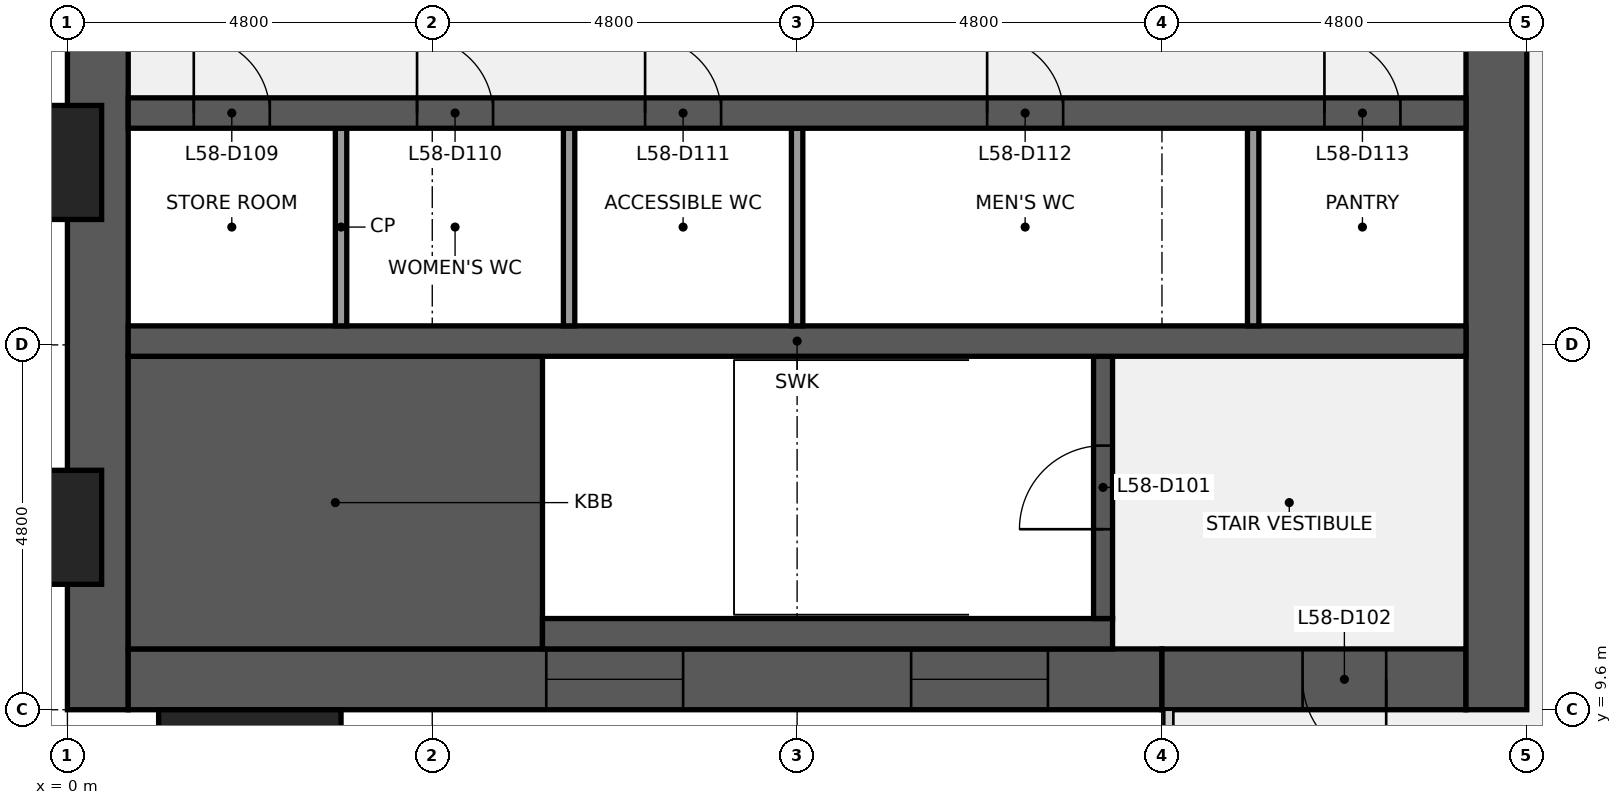
"""IFC4 building model, lengths in metres.
Left out: names, types, materials, properties, quantities, classifications, styles, units other than length and angle.
Written with IfcOpenShell. Run it as: python <this file> out.ifc"""

import sys

from ifc_helpers import new_model, si_unit, direction, frame, frame_2d, origin, origin_2d, place, context, subcontext, project, spatial, rectangle, extrude, element, fill, save


model = new_model("IFC4")
c1 = context("Model", 3, precision=1e-05, world=origin(), true_north=direction((0.0, 1.0)))
c2 = subcontext(c1, "Body", "Model", "MODEL_VIEW")
j1 = project(units=[si_unit("LENGTHUNIT", "METRE"), si_unit("PLANEANGLEUNIT", "RADIAN")], contexts=[c1])
p1 = place(None, origin())
s1 = spatial("IfcSite", under=j1, at=p1, CompositionType="ELEMENT")
p2 = place(p1, origin())
s2 = spatial("IfcBuilding", under=s1, at=p2, CompositionType="ELEMENT")
p3 = place(p2, frame((0.0, 0.0, 261.2)))
s3 = spatial("IfcBuildingStorey", under=s2, at=p3, CompositionType="ELEMENT", Elevation=261.2)
p4 = place(p3, frame((0.4, 9.6, 0.0), z_axis=(0.0, 0.0, 1.0), x_axis=(0.0, 1.0, 0.0)))
e1 = element("IfcWall", 1, at=p4, inside=s3, PredefinedType="SHEAR", context=c2, shape_type="SweptSolid", body=[
    extrude(rectangle(XDim=28.8, YDim=0.8, at=frame_2d((14.4, 0.0))), origin(), (0.0, 0.0, 1.0), 3.7),
])
p5 = place(p4, frame((8.85, 0.0, 0.9)))
e2 = element("IfcOpeningElement", 2, at=p5, cuts=e1, PredefinedType="OPENING", context=c2, shape_type="SweptSolid", body=[
    extrude(rectangle(XDim=1.5, YDim=1.5, at=frame_2d((0.75, 0.75))), frame((0.0, 0.41, 0.0), z_axis=(0.0, -1.0, 0.0), x_axis=(1.0, 0.0, 0.0)), (0.0, 0.0, 1.0), 0.82),
])
p6 = place(p4, frame((18.45, 0.0, 0.9)))
e3 = element("IfcOpeningElement", 3, at=p6, cuts=e1, PredefinedType="OPENING", context=c2, shape_type="SweptSolid", body=[
    extrude(rectangle(XDim=1.5, YDim=1.5, at=frame_2d((0.75, 0.75))), frame((0.0, 0.41, 0.0), z_axis=(0.0, -1.0, 0.0), x_axis=(1.0, 0.0, 0.0)), (0.0, 0.0, 1.0), 0.82),
])
p7 = place(p3, frame((14.4, 10.0, 0.0), z_axis=(0.0, 0.0, 1.0), x_axis=(-1.0, 0.0, 0.0)))
e4 = element("IfcWall", 4, at=p7, inside=s3, PredefinedType="SHEAR", context=c2, shape_type="SweptSolid", body=[
    extrude(rectangle(XDim=13.6, YDim=0.8, at=frame_2d((6.8, 0.0))), origin(), (0.0, 0.0, 1.0), 3.7),
])
p8 = place(p7, frame((6.3, 0.0, 0.9)))
e5 = element("IfcOpeningElement", 5, at=p8, cuts=e4, PredefinedType="OPENING", context=c2, shape_type="SweptSolid", body=[
    extrude(rectangle(XDim=1.8, YDim=1.5, at=frame_2d((0.9, 0.75))), frame((0.0, 0.41, 0.0), z_axis=(0.0, -1.0, 0.0), x_axis=(1.0, 0.0, 0.0)), (0.0, 0.0, 1.0), 0.82),
])
p9 = place(p7, frame((1.5, 0.0, 0.9)))
e6 = element("IfcOpeningElement", 6, at=p9, cuts=e4, PredefinedType="OPENING", context=c2, shape_type="SweptSolid", body=[
    extrude(rectangle(XDim=1.8, YDim=1.5, at=frame_2d((0.9, 0.75))), frame((0.0, 0.41, 0.0), z_axis=(0.0, -1.0, 0.0), x_axis=(1.0, 0.0, 0.0)), (0.0, 0.0, 1.0), 0.82),
])
p10 = place(p3, frame((18.4, 10.0, 0.0), z_axis=(0.0, 0.0, 1.0), x_axis=(-1.0, 0.0, 0.0)))
e7 = element("IfcWall", 7, at=p10, inside=s3, PredefinedType="SHEAR", context=c2, shape_type="SweptSolid", body=[
    extrude(rectangle(XDim=4.0, YDim=0.8, at=frame_2d((2.0, 0.0))), origin(), (0.0, 0.0, 1.0), 3.7),
])
p11 = place(p10, frame((1.05, 0.0, 0.0)))
e8 = element("IfcOpeningElement", 8, at=p11, cuts=e7, PredefinedType="OPENING", context=c2, shape_type="SweptSolid", body=[
    extrude(rectangle(XDim=1.1, YDim=2.1, at=frame_2d((0.55, 1.05))), frame((0.0, 0.41, 0.0), z_axis=(0.0, -1.0, 0.0), x_axis=(1.0, 0.0, 0.0)), (0.0, 0.0, 1.0), 0.82),
])
p12 = place(p3, frame((18.8, 38.4, 0.0), z_axis=(0.0, 0.0, 1.0), x_axis=(0.0, -1.0, 0.0)))
e9 = element("IfcWall", 9, at=p12, inside=s3, PredefinedType="SHEAR", context=c2, shape_type="SweptSolid", body=[
    extrude(rectangle(XDim=28.8, YDim=0.8, at=frame_2d((14.4, 0.0))), origin(), (0.0, 0.0, 1.0), 3.7),
])
p13 = place(p12, frame((18.3, 0.0, 0.0)))
e10 = element("IfcOpeningElement", 10, at=p13, cuts=e9, PredefinedType="OPENING", context=c2, shape_type="SweptSolid", body=[
    extrude(rectangle(XDim=1.8, YDim=2.1, at=frame_2d((0.9, 1.05))), frame((0.0, 0.41, 0.0), z_axis=(0.0, -1.0, 0.0), x_axis=(1.0, 0.0, 0.0)), (0.0, 0.0, 1.0), 0.82),
])
p14 = place(p12, frame((8.7, 0.0, 0.0)))
e11 = element("IfcOpeningElement", 11, at=p14, cuts=e9, PredefinedType="OPENING", context=c2, shape_type="SweptSolid", body=[
    extrude(rectangle(XDim=1.8, YDim=2.1, at=frame_2d((0.9, 1.05))), frame((0.0, 0.41, 0.0), z_axis=(0.0, -1.0, 0.0), x_axis=(1.0, 0.0, 0.0)), (0.0, 0.0, 1.0), 0.82),
])
p15 = place(p3, frame((0.8, 12.325, 0.0), z_axis=(0.0, 0.0, 1.0), x_axis=(1.0, 0.0, 0.0)))
e12 = element("IfcWall", 12, at=p15, inside=s3, PredefinedType="SHEAR", context=c2, shape_type="SweptSolid", body=[
    extrude(rectangle(XDim=5.45, YDim=3.85, at=frame_2d((2.725, 0.0))), origin(), (0.0, 0.0, 1.0), 3.7),
])
p16 = place(p3, frame((6.25, 10.6, 0.0), z_axis=(0.0, 0.0, 1.0), x_axis=(1.0, 0.0, 0.0)))
e13 = element("IfcWall", 13, at=p16, inside=s3, PredefinedType="SHEAR", context=c2, shape_type="SweptSolid", body=[
    extrude(rectangle(XDim=7.5, YDim=0.4, at=frame_2d((3.75, 0.0))), origin(), (0.0, 0.0, 1.0), 3.7),
])
p17 = place(p3, frame((13.625, 10.8, 0.0), z_axis=(0.0, 0.0, 1.0), x_axis=(0.0, 1.0, 0.0)))
e14 = element("IfcWall", 14, at=p17, inside=s3, PredefinedType="SHEAR", context=c2, shape_type="SweptSolid", body=[
    extrude(rectangle(XDim=3.45, YDim=0.25, at=frame_2d((1.725, 0.0))), origin(), (0.0, 0.0, 1.0), 3.7),
])
p18 = place(p17, frame((1.175, 0.0, 0.0)))
e15 = element("IfcOpeningElement", 15, at=p18, cuts=e14, PredefinedType="OPENING", context=c2, shape_type="SweptSolid", body=[
    extrude(rectangle(XDim=1.1, YDim=2.1, at=frame_2d((0.55, 1.05))), frame((0.0, 0.135, 0.0), z_axis=(0.0, -1.0, 0.0), x_axis=(1.0, 0.0, 0.0)), (0.0, 0.0, 1.0), 0.27),
])
p19 = place(p3, frame((0.8, 14.45, 0.0), z_axis=(0.0, 0.0, 1.0), x_axis=(1.0, 0.0, 0.0)))
e16 = element("IfcWall", 16, at=p19, inside=s3, PredefinedType="SHEAR", context=c2, shape_type="SweptSolid", body=[
    extrude(rectangle(XDim=17.6, YDim=0.4, at=frame_2d((8.8, 0.0))), origin(), (0.0, 0.0, 1.0), 3.7),
])
for number, where, z_axis, x_axis in (
    (17, (3.6, 14.65, 0.0), (0.0, 0.0, 1.0), (0.0, 1.0, 0.0)),
    (18, (6.6, 14.65, 0.0), (0.0, 0.0, 1.0), (0.0, 1.0, 0.0)),
    (19, (9.6, 14.65, 0.0), (0.0, 0.0, 1.0), (0.0, 1.0, 0.0)),
    (20, (15.6, 14.65, 0.0), (0.0, 0.0, 1.0), (0.0, 1.0, 0.0)),
):
    element("IfcWall", number, at=place(p3, frame(where, z_axis=z_axis, x_axis=x_axis)), inside=s3, PredefinedType="PARTITIONING", context=c2, shape_type="SweptSolid", body=[
        extrude(rectangle(XDim=2.6, YDim=0.15, at=frame_2d((1.3, 0.0))), origin(), (0.0, 0.0, 1.0), 3.7),
    ])
p20 = place(p3, frame((0.8, 17.45, 0.0), z_axis=(0.0, 0.0, 1.0), x_axis=(1.0, 0.0, 0.0)))
e21 = element("IfcWall", 21, at=p20, inside=s3, PredefinedType="SHEAR", context=c2, shape_type="SweptSolid", body=[
    extrude(rectangle(XDim=17.6, YDim=0.4, at=frame_2d((8.8, 0.0))), origin(), (0.0, 0.0, 1.0), 3.7),
])
p21 = place(p20, frame((0.863, 0.0, 0.0)))
e22 = element("IfcOpeningElement", 22, at=p21, cuts=e21, PredefinedType="OPENING", context=c2, shape_type="SweptSolid", body=[
    extrude(rectangle(XDim=1.0, YDim=2.1, at=frame_2d((0.5, 1.05))), frame((0.0, 0.21, 0.0), z_axis=(0.0, -1.0, 0.0), x_axis=(1.0, 0.0, 0.0)), (0.0, 0.0, 1.0), 0.42),
])
p22 = place(p20, frame((3.8, 0.0, 0.0)))
e23 = element("IfcOpeningElement", 23, at=p22, cuts=e21, PredefinedType="OPENING", context=c2, shape_type="SweptSolid", body=[
    extrude(rectangle(XDim=1.0, YDim=2.1, at=frame_2d((0.5, 1.05))), frame((0.0, 0.21, 0.0), z_axis=(0.0, -1.0, 0.0), x_axis=(1.0, 0.0, 0.0)), (0.0, 0.0, 1.0), 0.42),
])
p23 = place(p20, frame((6.8, 0.0, 0.0)))
e24 = element("IfcOpeningElement", 24, at=p23, cuts=e21, PredefinedType="OPENING", context=c2, shape_type="SweptSolid", body=[
    extrude(rectangle(XDim=1.0, YDim=2.1, at=frame_2d((0.5, 1.05))), frame((0.0, 0.21, 0.0), z_axis=(0.0, -1.0, 0.0), x_axis=(1.0, 0.0, 0.0)), (0.0, 0.0, 1.0), 0.42),
])
p24 = place(p20, frame((11.3, 0.0, 0.0)))
e25 = element("IfcOpeningElement", 25, at=p24, cuts=e21, PredefinedType="OPENING", context=c2, shape_type="SweptSolid", body=[
    extrude(rectangle(XDim=1.0, YDim=2.1, at=frame_2d((0.5, 1.05))), frame((0.0, 0.21, 0.0), z_axis=(0.0, -1.0, 0.0), x_axis=(1.0, 0.0, 0.0)), (0.0, 0.0, 1.0), 0.42),
])
p25 = place(p20, frame((15.738, 0.0, 0.0)))
e26 = element("IfcOpeningElement", 26, at=p25, cuts=e21, PredefinedType="OPENING", context=c2, shape_type="SweptSolid", body=[
    extrude(rectangle(XDim=1.0, YDim=2.1, at=frame_2d((0.5, 1.05))), frame((0.0, 0.21, 0.0), z_axis=(0.0, -1.0, 0.0), x_axis=(1.0, 0.0, 0.0)), (0.0, 0.0, 1.0), 0.42),
])
for number, where, z_axis, x_axis in (
    (27, (-0.75, 12.0, 0.0), (0.0, 0.0, 1.0), (0.0, 1.0, 0.0)),
    (28, (-0.75, 16.8, 0.0), (0.0, 0.0, 1.0), (0.0, 1.0, 0.0)),
    (29, (2.4, 8.85, 0.0), (0.0, 0.0, 1.0), (1.0, 0.0, 0.0)),
):
    element("IfcColumn", number, at=place(p3, frame(where, z_axis=z_axis, x_axis=x_axis)), inside=s3, PredefinedType="PILASTER", context=c2, shape_type="SweptSolid", body=[
        extrude(rectangle(XDim=2.4, YDim=1.5, at=origin_2d()), origin(), (0.0, 0.0, 1.0), 4.0),
    ])
p26 = place(p18, origin())
e30 = element("IfcDoor", 30, at=p26, inside=s3, OperationType="SINGLE_SWING_LEFT", PredefinedType="DOOR", context=c2, shape_type="SweptSolid", body=[
    extrude(rectangle(XDim=1.1, YDim=2.1, at=frame_2d((0.55, 1.05))), frame((0.0, 0.025, 0.0), z_axis=(0.0, -1.0, 0.0), x_axis=(1.0, 0.0, 0.0)), (0.0, 0.0, 1.0), 0.05),
])
fill(e15, e30)
p27 = place(p11, origin())
e31 = element("IfcDoor", 31, at=p27, inside=s3, OperationType="SINGLE_SWING_LEFT", PredefinedType="DOOR", context=c2, shape_type="SweptSolid", body=[
    extrude(rectangle(XDim=1.1, YDim=2.1, at=frame_2d((0.55, 1.05))), frame((0.0, 0.025, 0.0), z_axis=(0.0, -1.0, 0.0), x_axis=(1.0, 0.0, 0.0)), (0.0, 0.0, 1.0), 0.05),
])
fill(e8, e31)
p28 = place(p21, origin())
e32 = element("IfcDoor", 32, at=p28, inside=s3, OperationType="SINGLE_SWING_LEFT", PredefinedType="DOOR", context=c2, shape_type="SweptSolid", body=[
    extrude(rectangle(XDim=1.0, YDim=2.1, at=frame_2d((0.5, 1.05))), frame((0.0, 0.025, 0.0), z_axis=(0.0, -1.0, 0.0), x_axis=(1.0, 0.0, 0.0)), (0.0, 0.0, 1.0), 0.05),
])
fill(e22, e32)
p29 = place(p22, origin())
e33 = element("IfcDoor", 33, at=p29, inside=s3, OperationType="SINGLE_SWING_LEFT", PredefinedType="DOOR", context=c2, shape_type="SweptSolid", body=[
    extrude(rectangle(XDim=1.0, YDim=2.1, at=frame_2d((0.5, 1.05))), frame((0.0, 0.025, 0.0), z_axis=(0.0, -1.0, 0.0), x_axis=(1.0, 0.0, 0.0)), (0.0, 0.0, 1.0), 0.05),
])
fill(e23, e33)
p30 = place(p23, origin())
e34 = element("IfcDoor", 34, at=p30, inside=s3, OperationType="SINGLE_SWING_LEFT", PredefinedType="DOOR", context=c2, shape_type="SweptSolid", body=[
    extrude(rectangle(XDim=1.0, YDim=2.1, at=frame_2d((0.5, 1.05))), frame((0.0, 0.025, 0.0), z_axis=(0.0, -1.0, 0.0), x_axis=(1.0, 0.0, 0.0)), (0.0, 0.0, 1.0), 0.05),
])
fill(e24, e34)
p31 = place(p24, origin())
e35 = element("IfcDoor", 35, at=p31, inside=s3, OperationType="SINGLE_SWING_LEFT", PredefinedType="DOOR", context=c2, shape_type="SweptSolid", body=[
    extrude(rectangle(XDim=1.0, YDim=2.1, at=frame_2d((0.5, 1.05))), frame((0.0, 0.025, 0.0), z_axis=(0.0, -1.0, 0.0), x_axis=(1.0, 0.0, 0.0)), (0.0, 0.0, 1.0), 0.05),
])
fill(e25, e35)
p32 = place(p25, origin())
e36 = element("IfcDoor", 36, at=p32, inside=s3, OperationType="SINGLE_SWING_LEFT", PredefinedType="DOOR", context=c2, shape_type="SweptSolid", body=[
    extrude(rectangle(XDim=1.0, YDim=2.1, at=frame_2d((0.5, 1.05))), frame((0.0, 0.025, 0.0), z_axis=(0.0, -1.0, 0.0), x_axis=(1.0, 0.0, 0.0)), (0.0, 0.0, 1.0), 0.05),
])
fill(e26, e36)
p33 = place(p8, origin())
e37 = element("IfcWindow", 37, at=p33, inside=s3, PartitioningType="SINGLE_PANEL", PredefinedType="WINDOW", context=c2, shape_type="SweptSolid", body=[
    extrude(rectangle(XDim=1.8, YDim=1.5, at=frame_2d((0.9, 0.75))), frame((0.0, 0.03, 0.0), z_axis=(0.0, -1.0, 0.0), x_axis=(1.0, 0.0, 0.0)), (0.0, 0.0, 1.0), 0.06),
])
fill(e5, e37)
p34 = place(p9, origin())
e38 = element("IfcWindow", 38, at=p34, inside=s3, PartitioningType="SINGLE_PANEL", PredefinedType="WINDOW", context=c2, shape_type="SweptSolid", body=[
    extrude(rectangle(XDim=1.8, YDim=1.5, at=frame_2d((0.9, 0.75))), frame((0.0, 0.03, 0.0), z_axis=(0.0, -1.0, 0.0), x_axis=(1.0, 0.0, 0.0)), (0.0, 0.0, 1.0), 0.06),
])
fill(e6, e38)
save(model, sys.argv[1])
